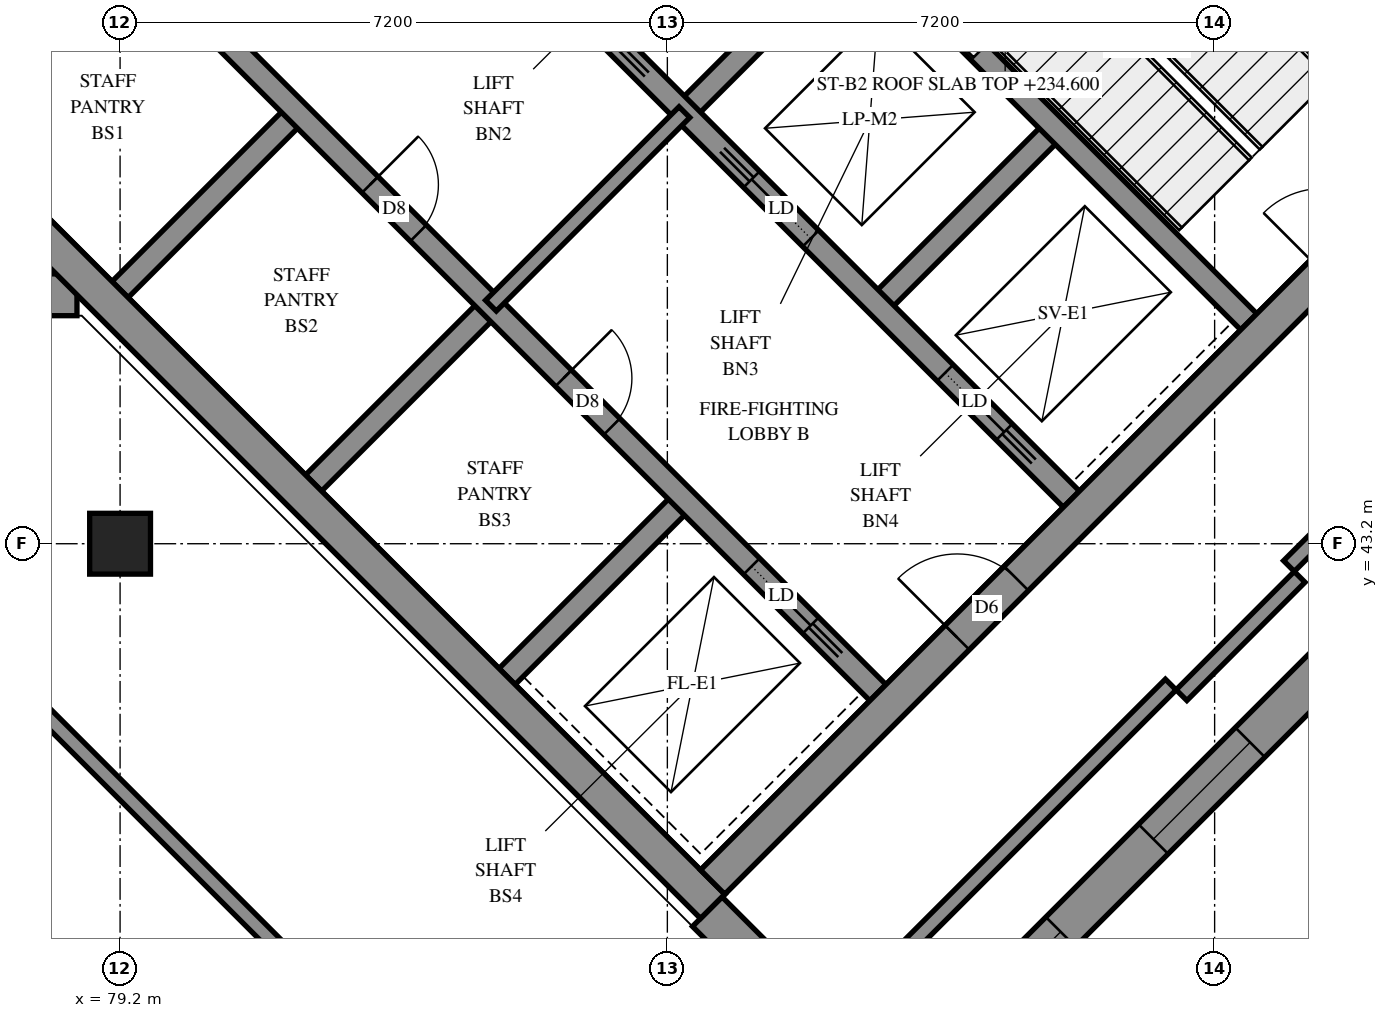
"""IFC4 building model, lengths in metres.
Left out: names, types, materials, properties, quantities, classifications, styles, units other than length and angle.
Written with IfcOpenShell. Run it as: python <this file> out.ifc"""

import sys

from ifc_helpers import new_model, si_unit, direction, frame, frame_2d, origin, origin_2d, place, context, subcontext, project, spatial, polyline, rectangle, outline, extrude, element, fill, save


model = new_model("IFC4")
c1 = context("Model", 3, precision=1e-05, world=origin(), true_north=direction((0.0, 1.0)))
c2 = subcontext(c1, "Body", "Model", "MODEL_VIEW")
j1 = project(units=[si_unit("LENGTHUNIT", "METRE"), si_unit("PLANEANGLEUNIT", "RADIAN")], contexts=[c1])
p1 = place(None, origin())
s1 = spatial("IfcSite", under=j1, at=p1, CompositionType="ELEMENT")
p2 = place(p1, origin())
s2 = spatial("IfcBuilding", under=s1, at=p2, CompositionType="ELEMENT")
p3 = place(p2, frame((0.0, 0.0, 234.6)))
s3 = spatial("IfcBuildingStorey", under=s2, at=p3, CompositionType="ELEMENT", Elevation=234.6)
p4 = place(p3, frame((79.2, 43.2, -0.3), z_axis=(0.0, 0.0, 1.0), x_axis=(1.0, 0.0, 0.0)))
e1 = element("IfcColumn", 1, at=p4, inside=s3, PredefinedType="COLUMN", context=c2, shape_type="SweptSolid", body=[
    extrude(rectangle(XDim=0.8, YDim=0.8, at=origin_2d()), origin(), (0.0, 0.0, 1.0), 5.0),
])
for number, where, z_axis, x_axis in (
    (2, (76.177, 49.249, -0.3), (0.0, 0.0, 1.0), (0.707, -0.707, 0.0)),
    (3, (86.678, 59.749, -0.3), (0.0, 0.0, 1.0), (0.707, -0.707, 0.0)),
):
    element("IfcWall", number, at=place(p3, frame(where, z_axis=z_axis, x_axis=x_axis)), inside=s3, PredefinedType="SHEAR", context=c2, shape_type="SweptSolid", body=[
        extrude(rectangle(XDim=15.3, YDim=0.45, at=frame_2d((7.65, 0.0))), origin(), (0.0, 0.0, 1.0), 4.3),
    ])
p5 = place(p3, frame((76.495, 49.249, -0.3), z_axis=(0.0, 0.0, 1.0), x_axis=(0.7071067812, 0.7071067812, 0.0)))
e4 = element("IfcWall", 4, at=p5, inside=s3, PredefinedType="SHEAR", context=c2, shape_type="SweptSolid", body=[
    extrude(rectangle(XDim=14.4, YDim=0.45, at=frame_2d((7.2, 0.0))), origin(), (0.0, 0.0, 1.0), 4.3),
])
p6 = place(p5, frame((4.55, 0.0, 0.3)))
e5 = element("IfcOpeningElement", 5, at=p6, cuts=e4, PredefinedType="OPENING", context=c2, shape_type="SweptSolid", body=[
    extrude(rectangle(XDim=1.1, YDim=2.1, at=frame_2d((0.55, 1.05))), frame((0.0, 0.235, 0.0), z_axis=(0.0, -1.0, 0.0), x_axis=(1.0, 0.0, 0.0)), (0.0, 0.0, 1.0), 0.47),
])
p7 = place(p5, frame((11.35, 0.0, 0.3)))
e6 = element("IfcOpeningElement", 6, at=p7, cuts=e4, PredefinedType="OPENING", context=c2, shape_type="SweptSolid", body=[
    extrude(rectangle(XDim=1.1, YDim=2.1, at=frame_2d((0.55, 1.05))), frame((0.0, 0.235, 0.0), z_axis=(0.0, -1.0, 0.0), x_axis=(1.0, 0.0, 0.0)), (0.0, 0.0, 1.0), 0.47),
])
p8 = place(p3, frame((86.996, 38.748, -0.3), z_axis=(0.0, 0.0, 1.0), x_axis=(0.7071067812, 0.7071067812, 0.0)))
e7 = element("IfcWall", 7, at=p8, inside=s3, PredefinedType="SHEAR", context=c2, shape_type="SweptSolid", body=[
    extrude(rectangle(XDim=14.4, YDim=0.45, at=frame_2d((7.2, 0.0))), origin(), (0.0, 0.0, 1.0), 4.3),
])
p9 = place(p8, frame((4.55, 0.0, 0.3)))
e8 = element("IfcOpeningElement", 8, at=p9, cuts=e7, PredefinedType="OPENING", context=c2, shape_type="SweptSolid", body=[
    extrude(rectangle(XDim=1.1, YDim=2.1, at=frame_2d((0.55, 1.05))), frame((0.0, 0.235, 0.0), z_axis=(0.0, -1.0, 0.0), x_axis=(1.0, 0.0, 0.0)), (0.0, 0.0, 1.0), 0.47),
])
p10 = place(p8, frame((11.35, 0.0, 0.3)))
e9 = element("IfcOpeningElement", 9, at=p10, cuts=e7, PredefinedType="OPENING", context=c2, shape_type="SweptSolid", body=[
    extrude(rectangle(XDim=1.1, YDim=2.1, at=frame_2d((0.55, 1.05))), frame((0.0, 0.235, 0.0), z_axis=(0.0, -1.0, 0.0), x_axis=(1.0, 0.0, 0.0)), (0.0, 0.0, 1.0), 0.47),
])
p11 = place(p3, frame((79.2, 46.544, 0.0), z_axis=(0.0, 0.0, 1.0), x_axis=(0.7071219326, 0.7070916295, 0.0)))
e10 = element("IfcWall", 10, at=p11, inside=s3, PredefinedType="SOLIDWALL", context=c2, shape_type="SweptSolid", body=[
    extrude(rectangle(XDim=3.3, YDim=0.3, at=frame_2d((1.65, 0.0))), origin(), (0.0, 0.0, 1.0), 4.7),
])
p12 = place(p3, frame((81.746, 43.999, 0.0), z_axis=(0.0, 0.0, 1.0), x_axis=(0.7071067812, 0.7071067812, 0.0)))
e11 = element("IfcWall", 11, at=p12, inside=s3, PredefinedType="SOLIDWALL", context=c2, shape_type="SweptSolid", body=[
    extrude(rectangle(XDim=3.3, YDim=0.3, at=frame_2d((1.65, 0.0))), origin(), (0.0, 0.0, 1.0), 4.7),
])
p13 = place(p3, frame((86.625, 48.878, 0.0), z_axis=(0.0, 0.0, 1.0), x_axis=(0.7071067812, 0.7071067812, 0.0)))
e12 = element("IfcWall", 12, at=p13, inside=s3, PredefinedType="SOLIDWALL", context=c2, shape_type="SweptSolid", body=[
    extrude(rectangle(XDim=3.3, YDim=0.3, at=frame_2d((1.65, 0.0))), origin(), (0.0, 0.0, 1.0), 4.7),
])
p14 = place(p3, frame((84.291, 41.453, 0.0), z_axis=(0.0, 0.0, 1.0), x_axis=(0.7071067812, 0.7071067812, 0.0)))
e13 = element("IfcWall", 13, at=p14, inside=s3, PredefinedType="SOLIDWALL", context=c2, shape_type="SweptSolid", body=[
    extrude(rectangle(XDim=3.3, YDim=0.3, at=frame_2d((1.65, 0.0))), origin(), (0.0, 0.0, 1.0), 4.7),
])
p15 = place(p3, frame((89.17, 46.332, 0.0), z_axis=(0.0, 0.0, 1.0), x_axis=(0.7071067812, 0.7071067812, 0.0)))
e14 = element("IfcWall", 14, at=p15, inside=s3, PredefinedType="SOLIDWALL", context=c2, shape_type="SweptSolid", body=[
    extrude(rectangle(XDim=3.3, YDim=0.3, at=frame_2d((1.65, 0.0))), origin(), (0.0, 0.0, 1.0), 4.7),
])
p16 = place(p3, frame((78.988, 51.423, 0.0), z_axis=(0.0, 0.0, 1.0), x_axis=(0.7071067812, -0.7071067812, 0.0)))
e15 = element("IfcWall", 15, at=p16, inside=s3, PredefinedType="SOLIDWALL", context=c2, shape_type="SweptSolid", body=[
    extrude(rectangle(XDim=14.4, YDim=0.3, at=frame_2d((7.2, 0.0))), origin(), (0.0, 0.0, 1.0), 4.7),
])
p17 = place(p16, frame((1.35, 0.0, 0.0)))
e16 = element("IfcOpeningElement", 16, at=p17, cuts=e15, PredefinedType="OPENING", context=c2, shape_type="SweptSolid", body=[
    extrude(rectangle(XDim=0.9, YDim=2.1, at=frame_2d((0.45, 1.05))), frame((0.0, 0.16, 0.0), z_axis=(0.0, -1.0, 0.0), x_axis=(1.0, 0.0, 0.0)), (0.0, 0.0, 1.0), 0.32),
])
p18 = place(p16, frame((4.95, 0.0, 0.0)))
e17 = element("IfcOpeningElement", 17, at=p18, cuts=e15, PredefinedType="OPENING", context=c2, shape_type="SweptSolid", body=[
    extrude(rectangle(XDim=0.9, YDim=2.1, at=frame_2d((0.45, 1.05))), frame((0.0, 0.16, 0.0), z_axis=(0.0, -1.0, 0.0), x_axis=(1.0, 0.0, 0.0)), (0.0, 0.0, 1.0), 0.32),
])
p19 = place(p16, frame((8.55, 0.0, 0.0)))
e18 = element("IfcOpeningElement", 18, at=p19, cuts=e15, PredefinedType="OPENING", context=c2, shape_type="SweptSolid", body=[
    extrude(rectangle(XDim=0.9, YDim=2.1, at=frame_2d((0.45, 1.05))), frame((0.0, 0.16, 0.0), z_axis=(0.0, -1.0, 0.0), x_axis=(1.0, 0.0, 0.0)), (0.0, 0.0, 1.0), 0.32),
])
p20 = place(p16, frame((12.05, 0.0, 0.0)))
e19 = element("IfcOpeningElement", 19, at=p20, cuts=e15, PredefinedType="OPENING", context=c2, shape_type="SweptSolid", body=[
    extrude(rectangle(XDim=1.1, YDim=2.1, at=frame_2d((0.55, 1.05))), frame((0.0, 0.16, 0.0), z_axis=(0.0, -1.0, 0.0), x_axis=(1.0, 0.0, 0.0)), (0.0, 0.0, 1.0), 0.32),
])
p21 = place(p3, frame((81.534, 53.969, 0.0), z_axis=(0.0, 0.0, 1.0), x_axis=(0.707103309, -0.7071102534, 0.0)))
e20 = element("IfcWall", 20, at=p21, inside=s3, PredefinedType="SOLIDWALL", context=c2, shape_type="SweptSolid", body=[
    extrude(rectangle(XDim=14.4, YDim=0.3, at=frame_2d((7.2, 0.0))), origin(), (0.0, 0.0, 1.0), 4.7),
])
p22 = place(p21, frame((1.25, 0.0, 0.0)))
e21 = element("IfcOpeningElement", 21, at=p22, cuts=e20, PredefinedType="OPENING", context=c2, shape_type="SweptSolid", body=[
    extrude(rectangle(XDim=1.1, YDim=2.1, at=frame_2d((0.55, 1.05))), frame((0.0, 0.16, 0.0), z_axis=(0.0, -1.0, 0.0), x_axis=(1.0, 0.0, 0.0)), (0.0, 0.0, 1.0), 0.32),
])
p23 = place(p21, frame((4.85, 0.0, 0.0)))
e22 = element("IfcOpeningElement", 22, at=p23, cuts=e20, PredefinedType="OPENING", context=c2, shape_type="SweptSolid", body=[
    extrude(rectangle(XDim=1.1, YDim=2.1, at=frame_2d((0.55, 1.05))), frame((0.0, 0.16, 0.0), z_axis=(0.0, -1.0, 0.0), x_axis=(1.0, 0.0, 0.0)), (0.0, 0.0, 1.0), 0.32),
])
p24 = place(p21, frame((8.45, 0.0, 0.0)))
e23 = element("IfcOpeningElement", 23, at=p24, cuts=e20, PredefinedType="OPENING", context=c2, shape_type="SweptSolid", body=[
    extrude(rectangle(XDim=1.1, YDim=2.1, at=frame_2d((0.55, 1.05))), frame((0.0, 0.16, 0.0), z_axis=(0.0, -1.0, 0.0), x_axis=(1.0, 0.0, 0.0)), (0.0, 0.0, 1.0), 0.32),
])
p25 = place(p21, frame((12.05, 0.0, 0.0)))
e24 = element("IfcOpeningElement", 24, at=p25, cuts=e20, PredefinedType="OPENING", context=c2, shape_type="SweptSolid", body=[
    extrude(rectangle(XDim=1.1, YDim=2.1, at=frame_2d((0.55, 1.05))), frame((0.0, 0.16, 0.0), z_axis=(0.0, -1.0, 0.0), x_axis=(1.0, 0.0, 0.0)), (0.0, 0.0, 1.0), 0.32),
])
p26 = place(p3, frame((88.958, 51.211, 0.0), z_axis=(0.0, 0.0, 1.0), x_axis=(0.7070998367, -0.7071137256, 0.0)))
e25 = element("IfcWall", 25, at=p26, inside=s3, PredefinedType="SOLIDWALL", context=c2, shape_type="SweptSolid", body=[
    extrude(rectangle(XDim=7.2, YDim=0.3, at=frame_2d((3.6, 0.0))), origin(), (0.0, 0.0, 1.0), 4.7),
])
p27 = place(p3, frame((53.675, 46.475, 0.0), z_axis=(0.0, 0.0, 1.0), x_axis=(1.0, 0.0, 0.0)))
e26 = element("IfcWall", 26, at=p27, inside=s3, PredefinedType="SOLIDWALL", context=c2, shape_type="SweptSolid", body=[
    extrude(outline(polyline([(-0.275, -0.275), (24.958, -0.275), (24.958, 0.275), (0.275, 0.275), (-0.275, -0.275)])), origin(), (0.0, 0.0, 1.0), 4.7),
])
p28 = place(p27, frame((1.3, 0.0, 0.9)))
e27 = element("IfcOpeningElement", 27, at=p28, cuts=e26, PredefinedType="OPENING", context=c2, shape_type="SweptSolid", body=[
    extrude(rectangle(XDim=1.8, YDim=3.6, at=frame_2d((0.9, 1.8))), frame((0.0, 0.285, 0.0), z_axis=(0.0, -1.0, 0.0), x_axis=(1.0, 0.0, 0.0)), (0.0, 0.0, 1.0), 0.57),
])
p29 = place(p27, frame((4.825, 0.0, 0.9)))
e28 = element("IfcOpeningElement", 28, at=p29, cuts=e26, PredefinedType="OPENING", context=c2, shape_type="SweptSolid", body=[
    extrude(rectangle(XDim=1.8, YDim=3.6, at=frame_2d((0.9, 1.8))), frame((0.0, 0.285, 0.0), z_axis=(0.0, -1.0, 0.0), x_axis=(1.0, 0.0, 0.0)), (0.0, 0.0, 1.0), 0.57),
])
p30 = place(p27, frame((8.425, 0.0, 0.9)))
e29 = element("IfcOpeningElement", 29, at=p30, cuts=e26, PredefinedType="OPENING", context=c2, shape_type="SweptSolid", body=[
    extrude(rectangle(XDim=1.8, YDim=3.6, at=frame_2d((0.9, 1.8))), frame((0.0, 0.285, 0.0), z_axis=(0.0, -1.0, 0.0), x_axis=(1.0, 0.0, 0.0)), (0.0, 0.0, 1.0), 0.57),
])
p31 = place(p27, frame((12.025, 0.0, 0.9)))
e30 = element("IfcOpeningElement", 30, at=p31, cuts=e26, PredefinedType="OPENING", context=c2, shape_type="SweptSolid", body=[
    extrude(rectangle(XDim=1.8, YDim=3.6, at=frame_2d((0.9, 1.8))), frame((0.0, 0.285, 0.0), z_axis=(0.0, -1.0, 0.0), x_axis=(1.0, 0.0, 0.0)), (0.0, 0.0, 1.0), 0.57),
])
p32 = place(p27, frame((15.625, 0.0, 0.9)))
e31 = element("IfcOpeningElement", 31, at=p32, cuts=e26, PredefinedType="OPENING", context=c2, shape_type="SweptSolid", body=[
    extrude(rectangle(XDim=1.8, YDim=3.6, at=frame_2d((0.9, 1.8))), frame((0.0, 0.285, 0.0), z_axis=(0.0, -1.0, 0.0), x_axis=(1.0, 0.0, 0.0)), (0.0, 0.0, 1.0), 0.57),
])
p33 = place(p27, frame((19.225, 0.0, 0.9)))
e32 = element("IfcOpeningElement", 32, at=p33, cuts=e26, PredefinedType="OPENING", context=c2, shape_type="SweptSolid", body=[
    extrude(rectangle(XDim=1.8, YDim=3.6, at=frame_2d((0.9, 1.8))), frame((0.0, 0.285, 0.0), z_axis=(0.0, -1.0, 0.0), x_axis=(1.0, 0.0, 0.0)), (0.0, 0.0, 1.0), 0.57),
])
p34 = place(p27, frame((22.3, 0.0, 0.9)))
e33 = element("IfcOpeningElement", 33, at=p34, cuts=e26, PredefinedType="OPENING", context=c2, shape_type="SweptSolid", body=[
    extrude(rectangle(XDim=1.8, YDim=3.6, at=frame_2d((0.9, 1.8))), frame((0.0, 0.285, 0.0), z_axis=(0.0, -1.0, 0.0), x_axis=(1.0, 0.0, 0.0)), (0.0, 0.0, 1.0), 0.57),
])
p35 = place(p3, frame((86.925, 38.359, 0.0), z_axis=(0.0, 0.0, 1.0), x_axis=(0.7070923923, -0.7071211698, 0.0)))
e34 = element("IfcWall", 34, at=p35, inside=s3, PredefinedType="SOLIDWALL", context=c2, shape_type="SweptSolid", body=[
    extrude(outline(polyline([(0.0, -0.275), (3.75, -0.275), (3.2, 0.275), (0.0, 0.275), (0.0, -0.275)])), origin(), (0.0, 0.0, 1.0), 4.7),
])
p36 = place(p35, frame((0.849, 0.0, 0.7)))
e35 = element("IfcOpeningElement", 35, at=p36, cuts=e34, PredefinedType="OPENING", context=c2, shape_type="SweptSolid", body=[
    extrude(rectangle(XDim=1.2, YDim=2.3, at=frame_2d((0.6, 1.15))), frame((0.0, 0.285, 0.0), z_axis=(0.0, -1.0, 0.0), x_axis=(1.0, 0.0, 0.0)), (0.0, 0.0, 1.0), 0.57),
])
p37 = place(p3, frame((89.382, 35.902, 0.0), z_axis=(0.0, 0.0, 1.0), x_axis=(0.7071067812, 0.7071067812, 0.0)))
e36 = element("IfcWall", 36, at=p37, inside=s3, PredefinedType="SOLIDWALL", context=c2, shape_type="SweptSolid", body=[
    extrude(outline(polyline([(-0.275, -0.275), (12.925, -0.275), (12.375, 0.275), (0.275, 0.275), (-0.275, -0.275)])), origin(), (0.0, 0.0, 1.0), 4.7),
])
p38 = place(p37, frame((1.3, 0.0, 0.9)))
e37 = element("IfcOpeningElement", 37, at=p38, cuts=e36, PredefinedType="OPENING", context=c2, shape_type="SweptSolid", body=[
    extrude(rectangle(XDim=1.8, YDim=3.6, at=frame_2d((0.9, 1.8))), frame((0.0, 0.285, 0.0), z_axis=(0.0, -1.0, 0.0), x_axis=(1.0, 0.0, 0.0)), (0.0, 0.0, 1.0), 0.57),
])
p39 = place(p37, frame((4.825, 0.0, 0.9)))
e38 = element("IfcOpeningElement", 38, at=p39, cuts=e36, PredefinedType="OPENING", context=c2, shape_type="SweptSolid", body=[
    extrude(rectangle(XDim=1.8, YDim=3.6, at=frame_2d((0.9, 1.8))), frame((0.0, 0.285, 0.0), z_axis=(0.0, -1.0, 0.0), x_axis=(1.0, 0.0, 0.0)), (0.0, 0.0, 1.0), 0.57),
])
p40 = place(p37, frame((8.425, 0.0, 0.9)))
e39 = element("IfcOpeningElement", 39, at=p40, cuts=e36, PredefinedType="OPENING", context=c2, shape_type="SweptSolid", body=[
    extrude(rectangle(XDim=1.8, YDim=3.6, at=frame_2d((0.9, 1.8))), frame((0.0, 0.285, 0.0), z_axis=(0.0, -1.0, 0.0), x_axis=(1.0, 0.0, 0.0)), (0.0, 0.0, 1.0), 0.57),
])
p41 = place(p3, frame((77.018, 42.15, 0.0), z_axis=(0.0, 0.0, 1.0), x_axis=(0.7071039217, -0.7071096407, 0.0)))
e40 = element("IfcWall", 40, at=p41, inside=s3, PredefinedType="SOLIDWALL", context=c2, shape_type="SweptSolid", body=[
    extrude(outline(polyline([(0.041, -0.1), (17.586, -0.1), (17.386, 0.1), (-0.041, 0.1), (0.041, -0.1)])), origin(), (0.0, 0.0, 1.0), 4.7),
])
p42 = place(p3, frame((89.382, 29.786, 0.0), z_axis=(0.0, 0.0, 1.0), x_axis=(0.7071094267, 0.7071041357, 0.0)))
e41 = element("IfcWall", 41, at=p42, inside=s3, PredefinedType="SOLIDWALL", context=c2, shape_type="SweptSolid", body=[
    extrude(outline(polyline([(-0.1, -0.1), (19.0, -0.1), (18.8, 0.1), (0.1, 0.1), (-0.1, -0.1)])), origin(), (0.0, 0.0, 1.0), 4.7),
])
p43 = place(p3, frame((84.079, 46.332, 0.0), z_axis=(0.0, 0.0, 1.0), x_axis=(0.7071067812, 0.7071067812, 0.0)))
e42 = element("IfcWall", 42, at=p43, inside=s3, PredefinedType="PARTITIONING", context=c2, shape_type="SweptSolid", body=[
    extrude(rectangle(XDim=3.6, YDim=0.2, at=frame_2d((1.8, 0.0))), origin(), (0.0, 0.0, 1.0), 4.7),
])
p44 = place(p3, frame((88.674, 36.999, 0.0), z_axis=(0.0, 0.0, 1.0), x_axis=(0.7071067812, 0.7071067812, 0.0)))
e43 = element("IfcWall", 43, at=p44, inside=s3, PredefinedType="PARTITIONING", context=c2, shape_type="SweptSolid", body=[
    extrude(rectangle(XDim=6.149, YDim=0.2, at=frame_2d((3.075, 0.0))), origin(), (0.0, 0.0, 1.0), 4.7),
])
p45 = place(p3, frame((94.578, 42.906, 0.0), z_axis=(0.0, 0.0, 1.0), x_axis=(0.7073734931, 0.7068399686, 0.0)))
e44 = element("IfcWall", 44, at=p45, inside=s3, PredefinedType="PARTITIONING", context=c2, shape_type="SweptSolid", body=[
    extrude(rectangle(XDim=3.749, YDim=0.2, at=frame_2d((1.874, 0.0))), origin(), (0.0, 0.0, 1.0), 4.7),
])
p46 = place(p3, frame((93.164, 41.208, 0.0), z_axis=(0.0, 0.0, 1.0), x_axis=(0.706651904, 0.7075613659, 0.0)))
e45 = element("IfcWall", 45, at=p46, inside=s3, PredefinedType="PARTITIONING", context=c2, shape_type="SweptSolid", body=[
    extrude(rectangle(XDim=2.199, YDim=0.2, at=frame_2d((1.1, 0.0))), origin(), (0.0, 0.0, 1.0), 4.7),
])
p47 = place(p38, origin())
e46 = element("IfcWindow", 46, at=p47, inside=s3, PartitioningType="SINGLE_PANEL", PredefinedType="WINDOW", context=c2, shape_type="SweptSolid", body=[
    extrude(rectangle(XDim=1.8, YDim=3.6, at=frame_2d((0.9, 1.8))), frame((0.0, 0.155, 0.0), z_axis=(0.0, -1.0, 0.0), x_axis=(1.0, 0.0, 0.0)), (0.0, 0.0, 1.0), 0.06),
])
fill(e37, e46)
p48 = place(p39, origin())
e47 = element("IfcWindow", 47, at=p48, inside=s3, PartitioningType="SINGLE_PANEL", PredefinedType="WINDOW", context=c2, shape_type="SweptSolid", body=[
    extrude(rectangle(XDim=1.8, YDim=3.6, at=frame_2d((0.9, 1.8))), frame((0.0, 0.155, 0.0), z_axis=(0.0, -1.0, 0.0), x_axis=(1.0, 0.0, 0.0)), (0.0, 0.0, 1.0), 0.06),
])
fill(e38, e47)
p49 = place(p9, origin())
e48 = element("IfcDoor", 48, at=p49, inside=s3, OperationType="DOUBLE_DOOR_SINGLE_SWING", PredefinedType="DOOR", context=c2, shape_type="SweptSolid", body=[
    extrude(rectangle(XDim=1.1, YDim=2.1, at=frame_2d((0.55, 1.05))), frame((0.0, 0.025, 0.0), z_axis=(0.0, -1.0, 0.0), x_axis=(1.0, 0.0, 0.0)), (0.0, 0.0, 1.0), 0.05),
])
fill(e8, e48)
p50 = place(p18, origin())
e49 = element("IfcDoor", 49, at=p50, inside=s3, OperationType="SINGLE_SWING_LEFT", PredefinedType="DOOR", context=c2, shape_type="SweptSolid", body=[
    extrude(rectangle(XDim=0.9, YDim=2.1, at=frame_2d((0.45, 1.05))), frame((0.0, 0.025, 0.0), z_axis=(0.0, -1.0, 0.0), x_axis=(1.0, 0.0, 0.0)), (0.0, 0.0, 1.0), 0.05),
])
fill(e17, e49)
p51 = place(p19, origin())
e50 = element("IfcDoor", 50, at=p51, inside=s3, OperationType="SINGLE_SWING_LEFT", PredefinedType="DOOR", context=c2, shape_type="SweptSolid", body=[
    extrude(rectangle(XDim=0.9, YDim=2.1, at=frame_2d((0.45, 1.05))), frame((0.0, 0.025, 0.0), z_axis=(0.0, -1.0, 0.0), x_axis=(1.0, 0.0, 0.0)), (0.0, 0.0, 1.0), 0.05),
])
fill(e18, e50)
p52 = place(p20, origin())
e51 = element("IfcDoor", 51, at=p52, inside=s3, OperationType="SLIDING_TO_RIGHT", PredefinedType="DOOR", context=c2, shape_type="SweptSolid", body=[
    extrude(rectangle(XDim=1.1, YDim=2.1, at=frame_2d((0.55, 1.05))), frame((0.0, 0.025, 0.0), z_axis=(0.0, -1.0, 0.0), x_axis=(1.0, 0.0, 0.0)), (0.0, 0.0, 1.0), 0.05),
])
fill(e19, e51)
p53 = place(p24, origin())
e52 = element("IfcDoor", 52, at=p53, inside=s3, OperationType="SLIDING_TO_LEFT", PredefinedType="DOOR", context=c2, shape_type="SweptSolid", body=[
    extrude(rectangle(XDim=1.1, YDim=2.1, at=frame_2d((0.55, 1.05))), frame((0.0, 0.025, 0.0), z_axis=(0.0, -1.0, 0.0), x_axis=(1.0, 0.0, 0.0)), (0.0, 0.0, 1.0), 0.05),
])
fill(e23, e52)
p54 = place(p25, origin())
e53 = element("IfcDoor", 53, at=p54, inside=s3, OperationType="SLIDING_TO_RIGHT", PredefinedType="DOOR", context=c2, shape_type="SweptSolid", body=[
    extrude(rectangle(XDim=1.1, YDim=2.1, at=frame_2d((0.55, 1.05))), frame((0.0, 0.025, 0.0), z_axis=(0.0, -1.0, 0.0), x_axis=(1.0, 0.0, 0.0)), (0.0, 0.0, 1.0), 0.05),
])
fill(e24, e53)
save(model, sys.argv[1])
